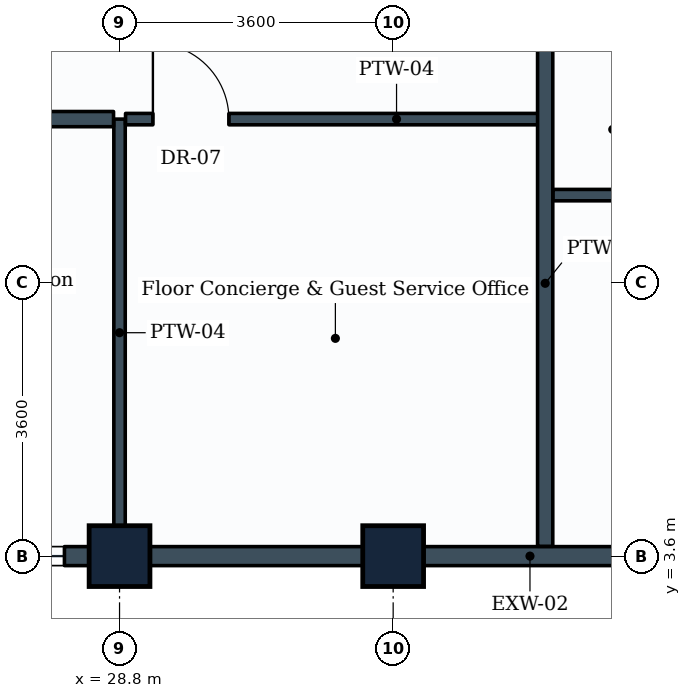
"""IFC4 building model, lengths in metres.
Left out: names, types, materials, properties, quantities, classifications, styles, units other than length and angle.
Written with IfcOpenShell. Run it as: python <this file> out.ifc"""

import sys

from ifc_helpers import new_model, si_unit, direction, frame, frame_2d, origin, origin_2d, place, context, subcontext, project, spatial, rectangle, extrude, element, fill, save


model = new_model("IFC4")
c1 = context("Model", 3, precision=1e-05, world=origin(), true_north=direction((0.0, 1.0)))
c2 = subcontext(c1, "Body", "Model", "MODEL_VIEW")
j1 = project(units=[si_unit("LENGTHUNIT", "METRE"), si_unit("PLANEANGLEUNIT", "RADIAN")], contexts=[c1])
p1 = place(None, origin())
s1 = spatial("IfcSite", under=j1, at=p1, CompositionType="ELEMENT")
p2 = place(p1, origin())
s2 = spatial("IfcBuilding", under=s1, at=p2, CompositionType="ELEMENT")
p3 = place(p2, frame((0.0, 0.0, 284.6)))
s3 = spatial("IfcBuildingStorey", under=s2, at=p3, CompositionType="ELEMENT", Elevation=284.6)
for number, where, z_axis, x_axis in (
    (1, (28.8, 3.6, 0.0), (0.0, 0.0, 1.0), (1.0, 0.0, 0.0)),
    (2, (32.4, 3.6, 0.0), (0.0, 0.0, 1.0), (1.0, 0.0, 0.0)),
):
    element("IfcColumn", number, at=place(p3, frame(where, z_axis=z_axis, x_axis=x_axis)), inside=s3, PredefinedType="COLUMN", context=c2, shape_type="SweptSolid", body=[
        extrude(rectangle(XDim=0.8, YDim=0.8, at=origin_2d()), origin(), (0.0, 0.0, 1.0), 3.6),
    ])
p4 = place(p3, frame((28.8, 3.6, 0.0), z_axis=(0.0, 0.0, 1.0), x_axis=(-1.0, 0.0, 0.0)))
e3 = element("IfcWall", 3, at=p4, inside=s3, PredefinedType="STANDARD", context=c2, shape_type="SweptSolid", body=[
    extrude(rectangle(XDim=3.6, YDim=0.25, at=frame_2d((1.8, 0.0))), origin(), (0.0, 0.0, 1.0), 2.83),
])
p5 = place(p4, frame((0.725, 0.0, 0.85)))
e4 = element("IfcOpeningElement", 4, at=p5, cuts=e3, PredefinedType="OPENING", context=c2, shape_type="SweptSolid", body=[
    extrude(rectangle(XDim=2.1, YDim=1.35, at=frame_2d((1.05, 0.675))), frame((0.0, 0.135, 0.0), z_axis=(0.0, -1.0, 0.0), x_axis=(1.0, 0.0, 0.0)), (0.0, 0.0, 1.0), 0.27),
])
p6 = place(p3, frame((32.4, 3.6, 0.0), z_axis=(0.0, 0.0, 1.0), x_axis=(-1.0, 0.0, 0.0)))
e5 = element("IfcWall", 5, at=p6, inside=s3, PredefinedType="STANDARD", context=c2, shape_type="SweptSolid", body=[
    extrude(rectangle(XDim=3.6, YDim=0.25, at=frame_2d((1.8, 0.0))), origin(), (0.0, 0.0, 1.0), 2.83),
])
p7 = place(p3, frame((36.0, 3.6, 0.0), z_axis=(0.0, 0.0, 1.0), x_axis=(-1.0, 0.0, 0.0)))
e6 = element("IfcWall", 6, at=p7, inside=s3, PredefinedType="STANDARD", context=c2, shape_type="SweptSolid", body=[
    extrude(rectangle(XDim=3.6, YDim=0.25, at=frame_2d((1.8, 0.0))), origin(), (0.0, 0.0, 1.0), 2.83),
])
p8 = place(p3, frame((28.8, 9.35, 0.0), z_axis=(0.0, 0.0, 1.0), x_axis=(0.0, -1.0, 0.0)))
e7 = element("IfcWall", 7, at=p8, inside=s3, PredefinedType="PARTITIONING", context=c2, shape_type="SweptSolid", body=[
    extrude(rectangle(XDim=5.621, YDim=0.15, at=frame_2d((2.811, 0.0))), origin(), (0.0, 0.0, 1.0), 3.335),
])
p9 = place(p3, frame((13.13, 9.35, 0.0), z_axis=(0.0, 0.0, 1.0), x_axis=(1.0, 0.0, 0.0)))
e8 = element("IfcWall", 8, at=p9, inside=s3, PredefinedType="PARTITIONING", context=c2, shape_type="SweptSolid", body=[
    extrude(rectangle(XDim=15.591, YDim=0.2, at=frame_2d((7.795, 0.0))), origin(), (0.0, 0.0, 1.0), 3.02),
])
p10 = place(p3, frame((28.879, 9.35, 0.0), z_axis=(0.0, 0.0, 1.0), x_axis=(1.0, 0.0, 0.0)))
e9 = element("IfcWall", 9, at=p10, inside=s3, PredefinedType="PARTITIONING", context=c2, shape_type="SweptSolid", body=[
    extrude(rectangle(XDim=5.521, YDim=0.15, at=frame_2d((2.76, 0.0))), origin(), (0.0, 0.0, 1.0), 3.335),
])
p11 = place(p10, frame((0.36, 0.0, 0.0)))
e10 = element("IfcOpeningElement", 10, at=p11, cuts=e9, PredefinedType="OPENING", context=c2, shape_type="SweptSolid", body=[
    extrude(rectangle(XDim=1.0, YDim=2.1, at=frame_2d((0.5, 1.05))), frame((0.0, 0.085, 0.0), z_axis=(0.0, -1.0, 0.0), x_axis=(1.0, 0.0, 0.0)), (0.0, 0.0, 1.0), 0.17),
])
p12 = place(p3, frame((34.4, 3.729, 0.0), z_axis=(0.0, 0.0, 1.0), x_axis=(0.0, 1.0, 0.0)))
e11 = element("IfcWall", 11, at=p12, inside=s3, PredefinedType="PARTITIONING", context=c2, shape_type="SweptSolid", body=[
    extrude(rectangle(XDim=6.921, YDim=0.2, at=frame_2d((3.46, 0.0))), origin(), (0.0, 0.0, 1.0), 2.83),
])
p13 = place(p3, frame((34.504, 8.35, 0.0), z_axis=(0.0, 0.0, 1.0), x_axis=(1.0, 0.0, 0.0)))
e12 = element("IfcWall", 12, at=p13, inside=s3, PredefinedType="PARTITIONING", context=c2, shape_type="SweptSolid", body=[
    extrude(rectangle(XDim=2.167, YDim=0.15, at=frame_2d((1.083, 0.0))), origin(), (0.0, 0.0, 1.0), 3.02),
])
p14 = place(p5, origin())
e13 = element("IfcWindow", 13, at=p14, inside=s3, PartitioningType="SINGLE_PANEL", PredefinedType="WINDOW", context=c2, shape_type="SweptSolid", body=[
    extrude(rectangle(XDim=2.1, YDim=1.35, at=frame_2d((1.05, 0.675))), frame((0.0, 0.03, 0.0), z_axis=(0.0, -1.0, 0.0), x_axis=(1.0, 0.0, 0.0)), (0.0, 0.0, 1.0), 0.06),
])
fill(e4, e13)
p15 = place(p11, origin())
e14 = element("IfcDoor", 14, at=p15, inside=s3, OperationType="SINGLE_SWING_LEFT", PredefinedType="DOOR", context=c2, shape_type="SweptSolid", body=[
    extrude(rectangle(XDim=1.0, YDim=2.1, at=frame_2d((0.5, 1.05))), frame((0.0, 0.025, 0.0), z_axis=(0.0, -1.0, 0.0), x_axis=(1.0, 0.0, 0.0)), (0.0, 0.0, 1.0), 0.05),
])
fill(e10, e14)
save(model, sys.argv[1])
